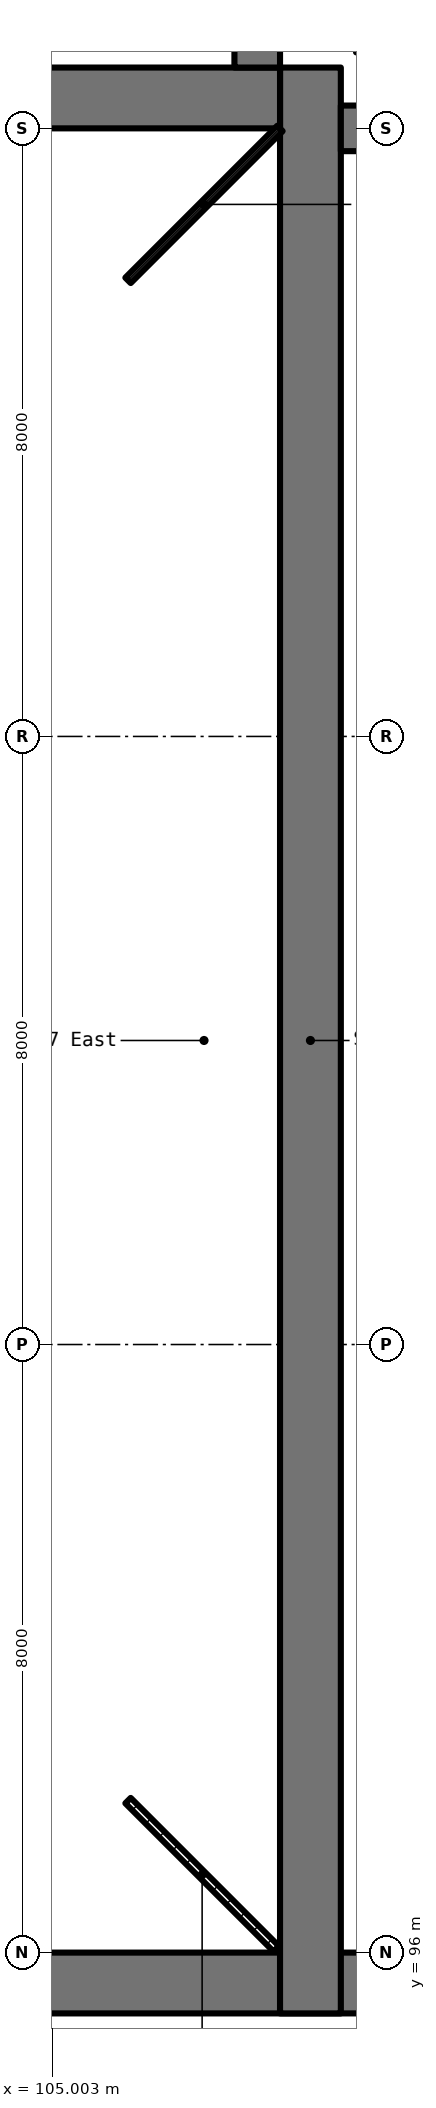
"""IFC4 building model, lengths in metres.
Left out: names, types, materials, properties, quantities, classifications, styles, units other than length and angle.
Written with IfcOpenShell. Run it as: python <this file> out.ifc"""

import sys

from ifc_helpers import new_model, si_unit, direction, frame, frame_2d, origin, place, context, subcontext, project, spatial, rectangle, extrude, element, save


model = new_model("IFC4")
c1 = context("Model", 3, precision=1e-05, world=origin(), true_north=direction((0.0, 1.0)))
c2 = subcontext(c1, "Body", "Model", "MODEL_VIEW")
j1 = project(units=[si_unit("LENGTHUNIT", "METRE"), si_unit("PLANEANGLEUNIT", "RADIAN")], contexts=[c1])
p1 = place(None, origin())
s1 = spatial("IfcSite", under=j1, at=p1, CompositionType="ELEMENT")
p2 = place(p1, origin())
s2 = spatial("IfcBuilding", under=s1, at=p2, CompositionType="ELEMENT")
p3 = place(p2, frame((0.0, 0.0, 17.0)))
s3 = spatial("IfcBuildingStorey", under=s2, at=p3, CompositionType="ELEMENT", Elevation=17.0)
p4 = place(p3, frame((76.0, 95.6, 0.0), z_axis=(0.0, 0.0, 1.0), x_axis=(1.0, 0.0, 0.0)))
e1 = element("IfcWall", 1, at=p4, inside=s3, PredefinedType="SHEAR", context=c2, shape_type="SweptSolid", body=[
    extrude(rectangle(XDim=40.0, YDim=0.8, at=frame_2d((20.0, 0.0))), origin(), (0.0, 0.0, 1.0), 5.5),
])
p5 = place(p3, frame((108.4, 95.2, 0.0), z_axis=(0.0, 0.0, 1.0), x_axis=(0.0, 1.0, 0.0)))
e2 = element("IfcWall", 2, at=p5, inside=s3, PredefinedType="SHEAR", context=c2, shape_type="SweptSolid", body=[
    extrude(rectangle(XDim=25.6, YDim=0.8, at=frame_2d((12.8, 0.0))), origin(), (0.0, 0.0, 1.0), 5.5),
])
p6 = place(p3, frame((84.0, 120.4, 0.0), z_axis=(0.0, 0.0, 1.0), x_axis=(1.0, 0.0, 0.0)))
e3 = element("IfcWall", 3, at=p6, inside=s3, PredefinedType="SHEAR", context=c2, shape_type="SweptSolid", body=[
    extrude(rectangle(XDim=24.0, YDim=0.8, at=frame_2d((12.0, 0.0))), origin(), (0.0, 0.0, 1.0), 5.5),
])
p7 = place(p3, frame((108.8, 120.0, 0.0), z_axis=(0.0, 0.0, 1.0), x_axis=(1.0, 0.0, 0.0)))
e4 = element("IfcWall", 4, at=p7, inside=s3, PredefinedType="SHEAR", context=c2, shape_type="SweptSolid", body=[
    extrude(rectangle(XDim=22.6, YDim=0.6, at=frame_2d((11.3, 0.0))), origin(), (0.0, 0.0, 1.0), 2.88),
])
p8 = place(p7, frame((4.917, 0.0, 1.4)))
e5 = element("IfcOpeningElement", 5, at=p8, cuts=e4, PredefinedType="OPENING", context=c2, shape_type="SweptSolid", body=[
    extrude(rectangle(XDim=1.5, YDim=1.0, at=frame_2d((0.75, 0.5))), frame((0.0, 0.312, 0.0), z_axis=(0.0, -1.0, 0.0), x_axis=(1.0, 0.0, 0.0)), (0.0, 0.0, 1.0), 0.624),
])
p9 = place(p7, frame((10.55, 0.0, 1.4)))
e6 = element("IfcOpeningElement", 6, at=p9, cuts=e4, PredefinedType="OPENING", context=c2, shape_type="SweptSolid", body=[
    extrude(rectangle(XDim=1.5, YDim=1.0, at=frame_2d((0.75, 0.5))), frame((0.0, 0.312, 0.0), z_axis=(0.0, -1.0, 0.0), x_axis=(1.0, 0.0, 0.0)), (0.0, 0.0, 1.0), 0.624),
])
p10 = place(p7, frame((16.183, 0.0, 1.4)))
e7 = element("IfcOpeningElement", 7, at=p10, cuts=e4, PredefinedType="OPENING", context=c2, shape_type="SweptSolid", body=[
    extrude(rectangle(XDim=1.5, YDim=1.0, at=frame_2d((0.75, 0.5))), frame((0.0, 0.312, 0.0), z_axis=(0.0, -1.0, 0.0), x_axis=(1.0, 0.0, 0.0)), (0.0, 0.0, 1.0), 0.624),
])
p11 = place(p3, frame((107.7, 120.8, 0.0), z_axis=(0.0, 0.0, 1.0), x_axis=(0.0, 1.0, 0.0)))
e8 = element("IfcWall", 8, at=p11, inside=s3, PredefinedType="SHEAR", context=c2, shape_type="SweptSolid", body=[
    extrude(rectangle(XDim=15.2, YDim=0.6, at=frame_2d((7.6, 0.0))), origin(), (0.0, 0.0, 1.0), 5.5),
])
p12 = place(p11, frame((2.6, 0.0, 1.4)))
e9 = element("IfcOpeningElement", 9, at=p12, cuts=e8, PredefinedType="OPENING", context=c2, shape_type="SweptSolid", body=[
    extrude(rectangle(XDim=2.4, YDim=1.0, at=frame_2d((1.2, 0.5))), frame((0.0, 0.312, 0.0), z_axis=(0.0, -1.0, 0.0), x_axis=(1.0, 0.0, 0.0)), (0.0, 0.0, 1.0), 0.624),
])
p13 = place(p11, frame((10.2, 0.0, 1.4)))
e10 = element("IfcOpeningElement", 10, at=p13, cuts=e8, PredefinedType="OPENING", context=c2, shape_type="SweptSolid", body=[
    extrude(rectangle(XDim=2.4, YDim=1.0, at=frame_2d((1.2, 0.5))), frame((0.0, 0.312, 0.0), z_axis=(0.0, -1.0, 0.0), x_axis=(1.0, 0.0, 0.0)), (0.0, 0.0, 1.0), 0.624),
])
p14 = place(p3, frame((106.0, 118.0, 0.0), z_axis=(0.0, 0.0, 1.0), x_axis=(0.707106781187, 0.707106781187, 0.0)))
e11 = element("IfcWall", 11, at=p14, inside=s3, PredefinedType="PARTITIONING", context=c2, shape_type="SweptSolid", body=[
    extrude(rectangle(XDim=2.827, YDim=0.1, at=frame_2d((1.414, 0.0))), origin(), (0.0, 0.0, 1.0), 4.6),
])
p15 = place(p3, frame((107.95, 96.05, 0.0), z_axis=(0.0, 0.0, 1.0), x_axis=(-0.707106781187, 0.707106781187, 0.0)))
e12 = element("IfcWall", 12, at=p15, inside=s3, PredefinedType="PARTITIONING", context=c2, shape_type="SweptSolid", body=[
    extrude(rectangle(XDim=2.758, YDim=0.1, at=frame_2d((1.379, 0.0))), origin(), (0.0, 0.0, 1.0), 4.6),
])
save(model, sys.argv[1])
